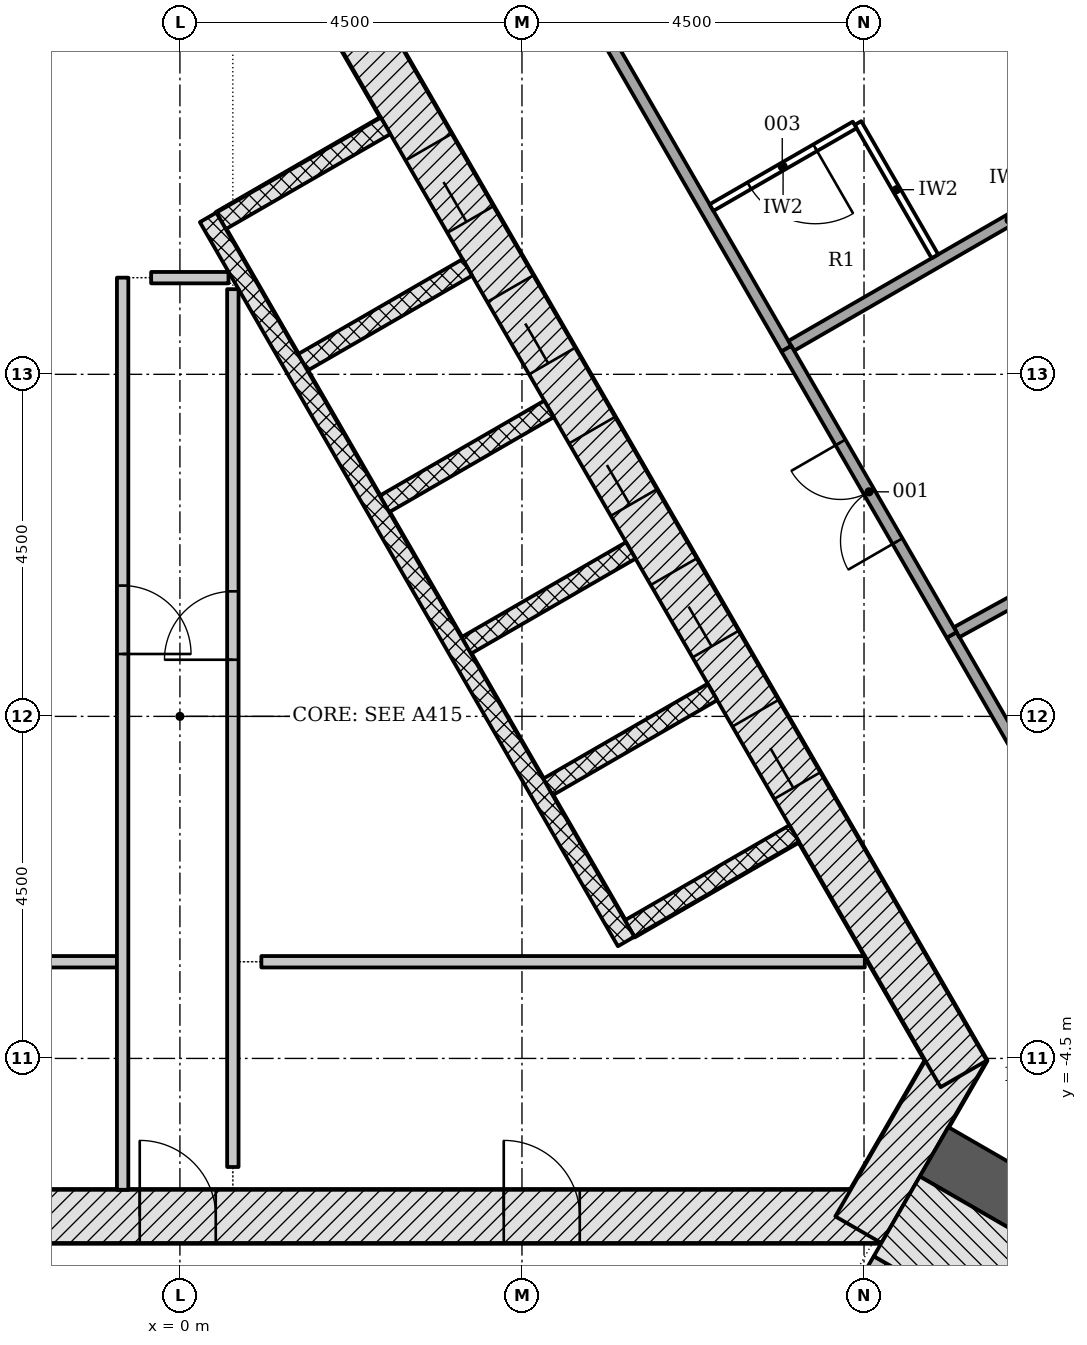
"""IFC4 building model, lengths in metres.
Left out: names, types, materials, properties, quantities, classifications, styles, units other than length and angle.
Written with IfcOpenShell. Run it as: python <this file> out.ifc"""

import sys

from ifc_helpers import new_model, si_unit, direction, frame, frame_2d, origin, place, context, subcontext, project, spatial, rectangle, extrude, element, fill, save


model = new_model("IFC4")
c1 = context("Model", 3, precision=1e-05, world=origin(), true_north=direction((0.0, 1.0)))
c2 = subcontext(c1, "Body", "Model", "MODEL_VIEW")
j1 = project(units=[si_unit("LENGTHUNIT", "METRE"), si_unit("PLANEANGLEUNIT", "RADIAN")], contexts=[c1])
p1 = place(None, origin())
s1 = spatial("IfcSite", under=j1, at=p1, CompositionType="ELEMENT")
p2 = place(p1, origin())
s2 = spatial("IfcBuilding", under=s1, at=p2, CompositionType="ELEMENT")
p3 = place(p2, frame((0.0, 0.0, 140.1)))
s3 = spatial("IfcBuildingStorey", under=s2, at=p3, CompositionType="ELEMENT", Elevation=140.1)
p4 = place(p3, frame((-9.229, -6.578, -0.2), z_axis=(0.0, 0.0, 1.0), x_axis=(1.0, 0.0, 0.0)))
e1 = element("IfcWall", 1, at=p4, inside=s3, PredefinedType="SHEAR", context=c2, shape_type="SweptSolid", body=[
    extrude(rectangle(XDim=18.458, YDim=0.7, at=frame_2d((9.229, 0.0))), origin(), (0.0, 0.0, 1.0), 3.6),
])
p5 = place(p4, frame((8.7, 0.0, 0.2)))
e2 = element("IfcOpeningElement", 2, at=p5, cuts=e1, PredefinedType="OPENING", context=c2, shape_type="SweptSolid", body=[
    extrude(rectangle(XDim=1.0, YDim=2.1, at=frame_2d((0.5, 1.05))), frame((0.0, 0.36, 0.0), z_axis=(0.0, -1.0, 0.0), x_axis=(1.0, 0.0, 0.0)), (0.0, 0.0, 1.0), 0.72),
])
p6 = place(p4, frame((3.99, 0.0, 0.2)))
e3 = element("IfcOpeningElement", 3, at=p6, cuts=e1, PredefinedType="OPENING", context=c2, shape_type="SweptSolid", body=[
    extrude(rectangle(XDim=0.9, YDim=2.1, at=frame_2d((0.45, 1.05))), frame((0.0, 0.36, 0.0), z_axis=(0.0, -1.0, 0.0), x_axis=(1.0, 0.0, 0.0)), (0.0, 0.0, 1.0), 0.72),
])
p7 = place(p4, frame((13.489, 0.0, 0.2)))
e4 = element("IfcOpeningElement", 4, at=p7, cuts=e1, PredefinedType="OPENING", context=c2, shape_type="SweptSolid", body=[
    extrude(rectangle(XDim=1.0, YDim=2.1, at=frame_2d((0.5, 1.05))), frame((0.0, 0.36, 0.0), z_axis=(0.0, -1.0, 0.0), x_axis=(1.0, 0.0, 0.0)), (0.0, 0.0, 1.0), 0.72),
])
p8 = place(p3, frame((8.926, -6.753, -0.2), z_axis=(0.0, 0.0, 1.0), x_axis=(0.500042739161, 0.866000726912, 0.0)))
e5 = element("IfcWall", 5, at=p8, inside=s3, PredefinedType="SHEAR", context=c2, shape_type="SweptSolid", body=[
    extrude(rectangle(XDim=2.771, YDim=0.7, at=frame_2d((1.386, 0.0))), origin(), (0.0, 0.0, 1.0), 3.6),
])
p9 = place(p3, frame((10.311, -4.703, -0.2), z_axis=(0.0, 0.0, 1.0), x_axis=(-0.500001446645, 0.866024568562, 0.0)))
e6 = element("IfcWall", 6, at=p9, inside=s3, PredefinedType="SHEAR", context=c2, shape_type="SweptSolid", body=[
    extrude(rectangle(XDim=18.458, YDim=0.7, at=frame_2d((9.229, 0.0))), origin(), (0.0, 0.0, 1.0), 3.6),
])
p10 = place(p9, frame((4.379, 0.0, 0.2)))
e7 = element("IfcOpeningElement", 7, at=p10, cuts=e6, PredefinedType="OPENING", context=c2, shape_type="SweptSolid", body=[
    extrude(rectangle(XDim=1.1, YDim=2.1, at=frame_2d((0.55, 1.05))), frame((0.0, 0.36, 0.0), z_axis=(0.0, -1.0, 0.0), x_axis=(1.0, 0.0, 0.0)), (0.0, 0.0, 1.0), 0.72),
])
p11 = place(p9, frame((6.529, 0.0, 0.2)))
e8 = element("IfcOpeningElement", 8, at=p11, cuts=e6, PredefinedType="OPENING", context=c2, shape_type="SweptSolid", body=[
    extrude(rectangle(XDim=1.1, YDim=2.1, at=frame_2d((0.55, 1.05))), frame((0.0, 0.36, 0.0), z_axis=(0.0, -1.0, 0.0), x_axis=(1.0, 0.0, 0.0)), (0.0, 0.0, 1.0), 0.72),
])
p12 = place(p9, frame((8.679, 0.0, 0.2)))
e9 = element("IfcOpeningElement", 9, at=p12, cuts=e6, PredefinedType="OPENING", context=c2, shape_type="SweptSolid", body=[
    extrude(rectangle(XDim=1.1, YDim=2.1, at=frame_2d((0.55, 1.05))), frame((0.0, 0.36, 0.0), z_axis=(0.0, -1.0, 0.0), x_axis=(1.0, 0.0, 0.0)), (0.0, 0.0, 1.0), 0.72),
])
p13 = place(p9, frame((10.829, 0.0, 0.2)))
e10 = element("IfcOpeningElement", 10, at=p13, cuts=e6, PredefinedType="OPENING", context=c2, shape_type="SweptSolid", body=[
    extrude(rectangle(XDim=1.1, YDim=2.1, at=frame_2d((0.55, 1.05))), frame((0.0, 0.36, 0.0), z_axis=(0.0, -1.0, 0.0), x_axis=(1.0, 0.0, 0.0)), (0.0, 0.0, 1.0), 0.72),
])
p14 = place(p9, frame((12.979, 0.0, 0.2)))
e11 = element("IfcOpeningElement", 11, at=p14, cuts=e6, PredefinedType="OPENING", context=c2, shape_type="SweptSolid", body=[
    extrude(rectangle(XDim=1.1, YDim=2.1, at=frame_2d((0.55, 1.05))), frame((0.0, 0.36, 0.0), z_axis=(0.0, -1.0, 0.0), x_axis=(1.0, 0.0, 0.0)), (0.0, 0.0, 1.0), 0.72),
])
p15 = place(p3, frame((-1.083, 11.281, -0.2), z_axis=(0.0, 0.0, 1.0), x_axis=(-0.500001446645, -0.866024568562, 0.0)))
e12 = element("IfcWall", 12, at=p15, inside=s3, PredefinedType="SHEAR", context=c2, shape_type="SweptSolid", body=[
    extrude(rectangle(XDim=18.458, YDim=0.7, at=frame_2d((9.229, 0.0))), origin(), (0.0, 0.0, 1.0), 3.6),
])
p16 = place(p15, frame((8.979, 0.0, 0.2)))
e13 = element("IfcOpeningElement", 13, at=p16, cuts=e12, PredefinedType="OPENING", context=c2, shape_type="SweptSolid", body=[
    extrude(rectangle(XDim=1.2, YDim=2.1, at=frame_2d((0.6, 1.05))), frame((0.0, 0.36, 0.0), z_axis=(0.0, -1.0, 0.0), x_axis=(1.0, 0.0, 0.0)), (0.0, 0.0, 1.0), 0.72),
])
p17 = place(p15, frame((11.029, 0.0, 0.2)))
e14 = element("IfcOpeningElement", 14, at=p17, cuts=e12, PredefinedType="OPENING", context=c2, shape_type="SweptSolid", body=[
    extrude(rectangle(XDim=1.2, YDim=2.1, at=frame_2d((0.6, 1.05))), frame((0.0, 0.36, 0.0), z_axis=(0.0, -1.0, 0.0), x_axis=(1.0, 0.0, 0.0)), (0.0, 0.0, 1.0), 0.72),
])
p18 = place(p3, frame((9.922, -5.728, -0.2), z_axis=(0.0, 0.0, 1.0), x_axis=(0.866023928423, -0.500002555393, 0.0)))
e15 = element("IfcWall", 15, at=p18, inside=s3, PredefinedType="SHEAR", context=c2, shape_type="SweptSolid", body=[
    extrude(rectangle(XDim=11.167, YDim=0.75, at=frame_2d((5.583, 0.0))), origin(), (0.0, 0.0, 1.0), 3.6),
])
for number, where, z_axis, x_axis in (
    (16, (8.081, -1.541, -0.2), (0.0, 0.0, 1.0), (-0.866, -0.5, 0.0)),
    (17, (7.006, 0.321, -0.2), (0.0, 0.0, 1.0), (-0.866, -0.5, 0.0)),
):
    element("IfcWall", number, at=place(p3, frame(where, z_axis=z_axis, x_axis=x_axis)), inside=s3, PredefinedType="PARTITIONING", context=c2, shape_type="SweptSolid", body=[
        extrude(rectangle(XDim=2.5, YDim=0.25, at=frame_2d((1.25, 0.0))), origin(), (0.0, 0.0, 1.0), 3.6),
    ])
p19 = place(p3, frame((5.931, 2.183, -0.2), z_axis=(0.0, 0.0, 1.0), x_axis=(-0.866047370643, -0.499961950354, 0.0)))
e18 = element("IfcWall", 18, at=p19, inside=s3, PredefinedType="PARTITIONING", context=c2, shape_type="SweptSolid", body=[
    extrude(rectangle(XDim=2.5, YDim=0.25, at=frame_2d((1.25, 0.0))), origin(), (0.0, 0.0, 1.0), 3.6),
])
for number, where, z_axis, x_axis in (
    (19, (4.856, 4.045, -0.2), (0.0, 0.0, 1.0), (-0.866, -0.5, 0.0)),
    (20, (3.781, 5.907, -0.2), (0.0, 0.0, 1.0), (-0.866, -0.5, 0.0)),
    (21, (2.706, 7.769, -0.2), (0.0, 0.0, 1.0), (-0.866, -0.5, 0.0)),
):
    element("IfcWall", number, at=place(p3, frame(where, z_axis=z_axis, x_axis=x_axis)), inside=s3, PredefinedType="PARTITIONING", context=c2, shape_type="SweptSolid", body=[
        extrude(rectangle(XDim=2.5, YDim=0.25, at=frame_2d((1.25, 0.0))), origin(), (0.0, 0.0, 1.0), 3.6),
    ])
p20 = place(p3, frame((5.87, -2.961, 0.0), z_axis=(0.0, 0.0, 1.0), x_axis=(-0.50000615651, 0.866021849293, 0.0)))
e22 = element("IfcWall", 22, at=p20, inside=s3, PredefinedType="PARTITIONING", context=c2, shape_type="SweptSolid", body=[
    extrude(rectangle(XDim=11.0, YDim=0.25, at=frame_2d((5.5, 0.0))), origin(), (0.0, 0.0, 1.0), 3.4),
])
p21 = place(p3, frame((-5.373, -3.228, 0.0), z_axis=(0.0, 0.0, 1.0), x_axis=(1.0, 0.0, 0.0)))
e23 = element("IfcWall", 23, at=p21, inside=s3, PredefinedType="PARTITIONING", context=c2, shape_type="SweptSolid", body=[
    extrude(rectangle(XDim=4.545, YDim=0.15, at=frame_2d((2.272, 0.0))), origin(), (0.0, 0.0, 1.0), 3.4),
])
p22 = place(p3, frame((-0.754, 5.772, 0.0), z_axis=(0.0, 0.0, 1.0), x_axis=(0.0, -1.0, 0.0)))
e24 = element("IfcWall", 24, at=p22, inside=s3, PredefinedType="PARTITIONING", context=c2, shape_type="SweptSolid", body=[
    extrude(rectangle(XDim=12.0, YDim=0.15, at=frame_2d((6.0, 0.0))), origin(), (0.0, 0.0, 1.0), 3.4),
])
p23 = place(p22, frame((4.051, 0.0, 0.0)))
e25 = element("IfcOpeningElement", 25, at=p23, cuts=e24, PredefinedType="OPENING", context=c2, shape_type="SweptSolid", body=[
    extrude(rectangle(XDim=0.9, YDim=2.1, at=frame_2d((0.45, 1.05))), frame((0.0, 0.085, 0.0), z_axis=(0.0, -1.0, 0.0), x_axis=(1.0, 0.0, 0.0)), (0.0, 0.0, 1.0), 0.17),
])
p24 = place(p3, frame((-0.379, 5.772, 0.0), z_axis=(0.0, 0.0, 1.0), x_axis=(1.0, 0.0, 0.0)))
e26 = element("IfcWall", 26, at=p24, inside=s3, PredefinedType="PARTITIONING", context=c2, shape_type="SweptSolid", body=[
    extrude(rectangle(XDim=1.018, YDim=0.15, at=frame_2d((0.509, 0.0))), origin(), (0.0, 0.0, 1.0), 3.4),
])
p25 = place(p3, frame((0.696, -5.928, 0.0), z_axis=(0.0, 0.0, 1.0), x_axis=(0.0, 1.0, 0.0)))
e27 = element("IfcWall", 27, at=p25, inside=s3, PredefinedType="PARTITIONING", context=c2, shape_type="SweptSolid", body=[
    extrude(rectangle(XDim=11.549, YDim=0.15, at=frame_2d((5.774, 0.0))), origin(), (0.0, 0.0, 1.0), 3.4),
])
p26 = place(p25, frame((6.673, 0.0, 0.0)))
e28 = element("IfcOpeningElement", 28, at=p26, cuts=e27, PredefinedType="OPENING", context=c2, shape_type="SweptSolid", body=[
    extrude(rectangle(XDim=0.9, YDim=2.1, at=frame_2d((0.45, 1.05))), frame((0.0, 0.085, 0.0), z_axis=(0.0, -1.0, 0.0), x_axis=(1.0, 0.0, 0.0)), (0.0, 0.0, 1.0), 0.17),
])
p27 = place(p3, frame((1.071, -3.228, 0.0), z_axis=(0.0, 0.0, 1.0), x_axis=(1.0, 0.0, 0.0)))
e29 = element("IfcWall", 29, at=p27, inside=s3, PredefinedType="PARTITIONING", context=c2, shape_type="SweptSolid", body=[
    extrude(rectangle(XDim=7.939, YDim=0.15, at=frame_2d((3.97, 0.0))), origin(), (0.0, 0.0, 1.0), 3.4),
])
p28 = place(p3, frame((7.44, -10.226, -0.2), z_axis=(0.0, 0.0, 1.0), x_axis=(0.500022077904, 0.866012656725, 0.0)))
e30 = element("IfcWall", 30, at=p28, inside=s3, PredefinedType="SHEAR", context=c2, shape_type="SweptSolid", body=[
    extrude(rectangle(XDim=3.55, YDim=0.2, at=frame_2d((1.775, 0.0))), origin(), (0.0, 0.0, 1.0), 3.6),
])
p29 = place(p28, frame((1.175, 0.0, 0.2)))
e31 = element("IfcOpeningElement", 31, at=p29, cuts=e30, PredefinedType="OPENING", context=c2, shape_type="SweptSolid", body=[
    extrude(rectangle(XDim=1.2, YDim=2.1, at=frame_2d((0.6, 1.05))), frame((0.0, 0.11, 0.0), z_axis=(0.0, -1.0, 0.0), x_axis=(1.0, 0.0, 0.0)), (0.0, 0.0, 1.0), 0.22),
])
p30 = place(p3, frame((9.431, -6.577, -0.2), z_axis=(0.0, 0.0, 1.0), x_axis=(0.866018442252, -0.500012057535, 0.0)))
e32 = element("IfcWall", 32, at=p30, inside=s3, PredefinedType="SHEAR", context=c2, shape_type="SweptSolid", body=[
    extrude(rectangle(XDim=7.2, YDim=1.211, at=frame_2d((3.6, 0.0))), origin(), (0.0, 0.0, 1.0), 3.6),
])
p31 = place(p3, frame((15.782, -8.679, 0.0), z_axis=(0.0, 0.0, 1.0), x_axis=(-0.500008408626, 0.866020549008, 0.0)))
e33 = element("IfcWall", 33, at=p31, inside=s3, PredefinedType="PARTITIONING", context=c2, shape_type="SweptSolid", body=[
    extrude(rectangle(XDim=11.258, YDim=0.15, at=frame_2d((5.629, 0.0))), origin(), (0.0, 0.0, 1.0), 2.852),
])
p32 = place(p3, frame((7.979, 4.837, 0.0), z_axis=(0.0, 0.0, 1.0), x_axis=(-0.500014427086, 0.866017074142, 0.0)))
e34 = element("IfcWall", 34, at=p32, inside=s3, PredefinedType="PARTITIONING", context=c2, shape_type="SweptSolid", body=[
    extrude(rectangle(XDim=7.528, YDim=0.15, at=frame_2d((3.764, 0.0))), origin(), (0.0, 0.0, 1.0), 2.847),
])
p33 = place(p3, frame((15.98, 4.278, 0.0), z_axis=(0.0, 0.0, 1.0), x_axis=(-0.876090474863, -0.482146740997, 0.0)))
e35 = element("IfcWall", 35, at=p33, inside=s3, PredefinedType="PARTITIONING", context=c2, shape_type="SweptSolid", body=[
    extrude(rectangle(XDim=6.577, YDim=0.15, at=frame_2d((3.288, 0.0))), origin(), (0.0, 0.0, 1.0), 3.4),
])
p34 = place(p33, frame((2.826, 0.0, 0.0)))
e36 = element("IfcOpeningElement", 36, at=p34, cuts=e35, PredefinedType="OPENING", context=c2, shape_type="SweptSolid", body=[
    extrude(rectangle(XDim=1.0, YDim=2.1, at=frame_2d((0.5, 1.05))), frame((0.0, 0.085, 0.0), z_axis=(0.0, -1.0, 0.0), x_axis=(1.0, 0.0, 0.0)), (0.0, 0.0, 1.0), 0.17),
])
p35 = place(p3, frame((13.774, 8.183, 0.0), z_axis=(0.0, 0.0, 1.0), x_axis=(-0.866027686223, -0.499996046679, 0.0)))
e37 = element("IfcWall", 37, at=p35, inside=s3, PredefinedType="PARTITIONING", context=c2, shape_type="SweptSolid", body=[
    extrude(rectangle(XDim=6.617, YDim=0.15, at=frame_2d((3.309, 0.0))), origin(), (0.0, 0.0, 1.0), 3.4),
])
p36 = place(p35, frame((1.696, 0.0, 0.0)))
e38 = element("IfcOpeningElement", 38, at=p36, cuts=e37, PredefinedType="OPENING", context=c2, shape_type="SweptSolid", body=[
    extrude(rectangle(XDim=1.0, YDim=2.1, at=frame_2d((0.5, 1.05))), frame((0.0, 0.085, 0.0), z_axis=(0.0, -1.0, 0.0), x_axis=(1.0, 0.0, 0.0)), (0.0, 0.0, 1.0), 0.17),
])
p37 = place(p3, frame((10.153, 1.071, 0.0), z_axis=(0.0, 0.0, 1.0), x_axis=(-0.499967049188, 0.866044427109, 0.0)))
e39 = element("IfcWall", 39, at=p37, inside=s3, PredefinedType="PARTITIONING", context=c2, shape_type="SweptSolid", body=[
    extrude(rectangle(XDim=4.349, YDim=0.15, at=frame_2d((2.174, 0.0))), origin(), (0.0, 0.0, 1.0), 2.847),
])
p38 = place(p37, frame((1.425, 0.0, 0.0)))
e40 = element("IfcOpeningElement", 40, at=p38, cuts=e39, PredefinedType="OPENING", context=c2, shape_type="SweptSolid", body=[
    extrude(rectangle(XDim=1.5, YDim=2.1, at=frame_2d((0.75, 1.05))), frame((0.0, 0.085, 0.0), z_axis=(0.0, -1.0, 0.0), x_axis=(1.0, 0.0, 0.0)), (0.0, 0.0, 1.0), 0.17),
])
p39 = place(p3, frame((9.933, 6.052, 0.0), z_axis=(0.0, 0.0, 1.0), x_axis=(-0.499990325971, 0.866030989016, 0.0)))
e41 = element("IfcWall", 41, at=p39, inside=s3, PredefinedType="PARTITIONING", context=c2, shape_type="SweptSolid", body=[
    extrude(rectangle(XDim=2.025, YDim=0.1, at=frame_2d((1.012, 0.0))), origin(), (0.0, 0.0, 1.0), 3.4),
])
p40 = place(p3, frame((8.877, 7.781, 0.0), z_axis=(0.0, 0.0, 1.0), x_axis=(-0.865989304205, -0.500062521093, 0.0)))
e42 = element("IfcWall", 42, at=p40, inside=s3, PredefinedType="PARTITIONING", context=c2, shape_type="SweptSolid", body=[
    extrude(rectangle(XDim=2.175, YDim=0.1, at=frame_2d((1.087, 0.0))), origin(), (0.0, 0.0, 1.0), 3.4),
])
p41 = place(p40, frame((0.6, 0.0, 0.0)))
e43 = element("IfcOpeningElement", 43, at=p41, cuts=e42, PredefinedType="OPENING", context=c2, shape_type="SweptSolid", body=[
    extrude(rectangle(XDim=1.0, YDim=2.1, at=frame_2d((0.5, 1.05))), frame((0.0, 0.06, 0.0), z_axis=(0.0, -1.0, 0.0), x_axis=(1.0, 0.0, 0.0)), (0.0, 0.0, 1.0), 0.12),
])
p42 = place(p3, frame((-0.375, 18.807, 0.0), z_axis=(0.0, 0.0, 1.0), x_axis=(-0.499995562011, -0.866027966043, 0.0)))
e44 = element("IfcWall", 44, at=p42, inside=s3, PredefinedType="PARTITIONING", context=c2, shape_type="SweptSolid", body=[
    extrude(rectangle(XDim=11.942, YDim=0.15, at=frame_2d((5.971, 0.0))), origin(), (0.0, 0.0, 1.0), 2.852),
])
p43 = place(p10, origin())
e45 = element("IfcDoor", 45, at=p43, inside=s3, OperationType="DOUBLE_DOOR_SLIDING", PredefinedType="DOOR", context=c2, shape_type="SweptSolid", body=[
    extrude(rectangle(XDim=1.1, YDim=2.1, at=frame_2d((0.55, 1.05))), frame((0.0, 0.025, 0.0), z_axis=(0.0, -1.0, 0.0), x_axis=(1.0, 0.0, 0.0)), (0.0, 0.0, 1.0), 0.05),
])
fill(e7, e45)
p44 = place(p11, origin())
e46 = element("IfcDoor", 46, at=p44, inside=s3, OperationType="DOUBLE_DOOR_SLIDING", PredefinedType="DOOR", context=c2, shape_type="SweptSolid", body=[
    extrude(rectangle(XDim=1.1, YDim=2.1, at=frame_2d((0.55, 1.05))), frame((0.0, 0.025, 0.0), z_axis=(0.0, -1.0, 0.0), x_axis=(1.0, 0.0, 0.0)), (0.0, 0.0, 1.0), 0.05),
])
fill(e8, e46)
p45 = place(p12, origin())
e47 = element("IfcDoor", 47, at=p45, inside=s3, OperationType="DOUBLE_DOOR_SLIDING", PredefinedType="DOOR", context=c2, shape_type="SweptSolid", body=[
    extrude(rectangle(XDim=1.1, YDim=2.1, at=frame_2d((0.55, 1.05))), frame((0.0, 0.025, 0.0), z_axis=(0.0, -1.0, 0.0), x_axis=(1.0, 0.0, 0.0)), (0.0, 0.0, 1.0), 0.05),
])
fill(e9, e47)
p46 = place(p13, origin())
e48 = element("IfcDoor", 48, at=p46, inside=s3, OperationType="DOUBLE_DOOR_SLIDING", PredefinedType="DOOR", context=c2, shape_type="SweptSolid", body=[
    extrude(rectangle(XDim=1.1, YDim=2.1, at=frame_2d((0.55, 1.05))), frame((0.0, 0.025, 0.0), z_axis=(0.0, -1.0, 0.0), x_axis=(1.0, 0.0, 0.0)), (0.0, 0.0, 1.0), 0.05),
])
fill(e10, e48)
p47 = place(p14, origin())
e49 = element("IfcDoor", 49, at=p47, inside=s3, OperationType="DOUBLE_DOOR_SLIDING", PredefinedType="DOOR", context=c2, shape_type="SweptSolid", body=[
    extrude(rectangle(XDim=1.1, YDim=2.1, at=frame_2d((0.55, 1.05))), frame((0.0, 0.025, 0.0), z_axis=(0.0, -1.0, 0.0), x_axis=(1.0, 0.0, 0.0)), (0.0, 0.0, 1.0), 0.05),
])
fill(e11, e49)
p48 = place(p5, origin())
e50 = element("IfcDoor", 50, at=p48, inside=s3, OperationType="SINGLE_SWING_LEFT", PredefinedType="DOOR", context=c2, shape_type="SweptSolid", body=[
    extrude(rectangle(XDim=1.0, YDim=2.1, at=frame_2d((0.5, 1.05))), frame((0.0, 0.075, 0.0), z_axis=(0.0, -1.0, 0.0), x_axis=(1.0, 0.0, 0.0)), (0.0, 0.0, 1.0), 0.15),
])
fill(e2, e50)
p49 = place(p7, origin())
e51 = element("IfcDoor", 51, at=p49, inside=s3, OperationType="SINGLE_SWING_LEFT", PredefinedType="DOOR", context=c2, shape_type="SweptSolid", body=[
    extrude(rectangle(XDim=1.0, YDim=2.1, at=frame_2d((0.5, 1.05))), frame((0.0, 0.075, 0.0), z_axis=(0.0, -1.0, 0.0), x_axis=(1.0, 0.0, 0.0)), (0.0, 0.0, 1.0), 0.15),
])
fill(e4, e51)
p50 = place(p23, origin())
e52 = element("IfcDoor", 52, at=p50, inside=s3, OperationType="SINGLE_SWING_RIGHT", PredefinedType="DOOR", context=c2, shape_type="SweptSolid", body=[
    extrude(rectangle(XDim=0.9, YDim=2.1, at=frame_2d((0.45, 1.05))), frame((0.0, 0.025, 0.0), z_axis=(0.0, -1.0, 0.0), x_axis=(1.0, 0.0, 0.0)), (0.0, 0.0, 1.0), 0.05),
])
fill(e25, e52)
p51 = place(p26, origin())
e53 = element("IfcDoor", 53, at=p51, inside=s3, OperationType="SINGLE_SWING_LEFT", PredefinedType="DOOR", context=c2, shape_type="SweptSolid", body=[
    extrude(rectangle(XDim=0.9, YDim=2.1, at=frame_2d((0.45, 1.05))), frame((0.0, 0.025, 0.0), z_axis=(0.0, -1.0, 0.0), x_axis=(1.0, 0.0, 0.0)), (0.0, 0.0, 1.0), 0.05),
])
fill(e28, e53)
p52 = place(p38, origin())
e54 = element("IfcDoor", 54, at=p52, inside=s3, OperationType="DOUBLE_DOOR_SINGLE_SWING", PredefinedType="DOOR", context=c2, shape_type="SweptSolid", body=[
    extrude(rectangle(XDim=1.5, YDim=2.1, at=frame_2d((0.75, 1.05))), frame((0.0, 0.025, 0.0), z_axis=(0.0, -1.0, 0.0), x_axis=(1.0, 0.0, 0.0)), (0.0, 0.0, 1.0), 0.05),
])
fill(e40, e54)
p53 = place(p41, origin())
e55 = element("IfcDoor", 55, at=p53, inside=s3, OperationType="SINGLE_SWING_LEFT", PredefinedType="DOOR", context=c2, shape_type="SweptSolid", body=[
    extrude(rectangle(XDim=1.0, YDim=2.1, at=frame_2d((0.5, 1.05))), frame((0.0, 0.025, 0.0), z_axis=(0.0, -1.0, 0.0), x_axis=(1.0, 0.0, 0.0)), (0.0, 0.0, 1.0), 0.05),
])
fill(e43, e55)
save(model, sys.argv[1])
